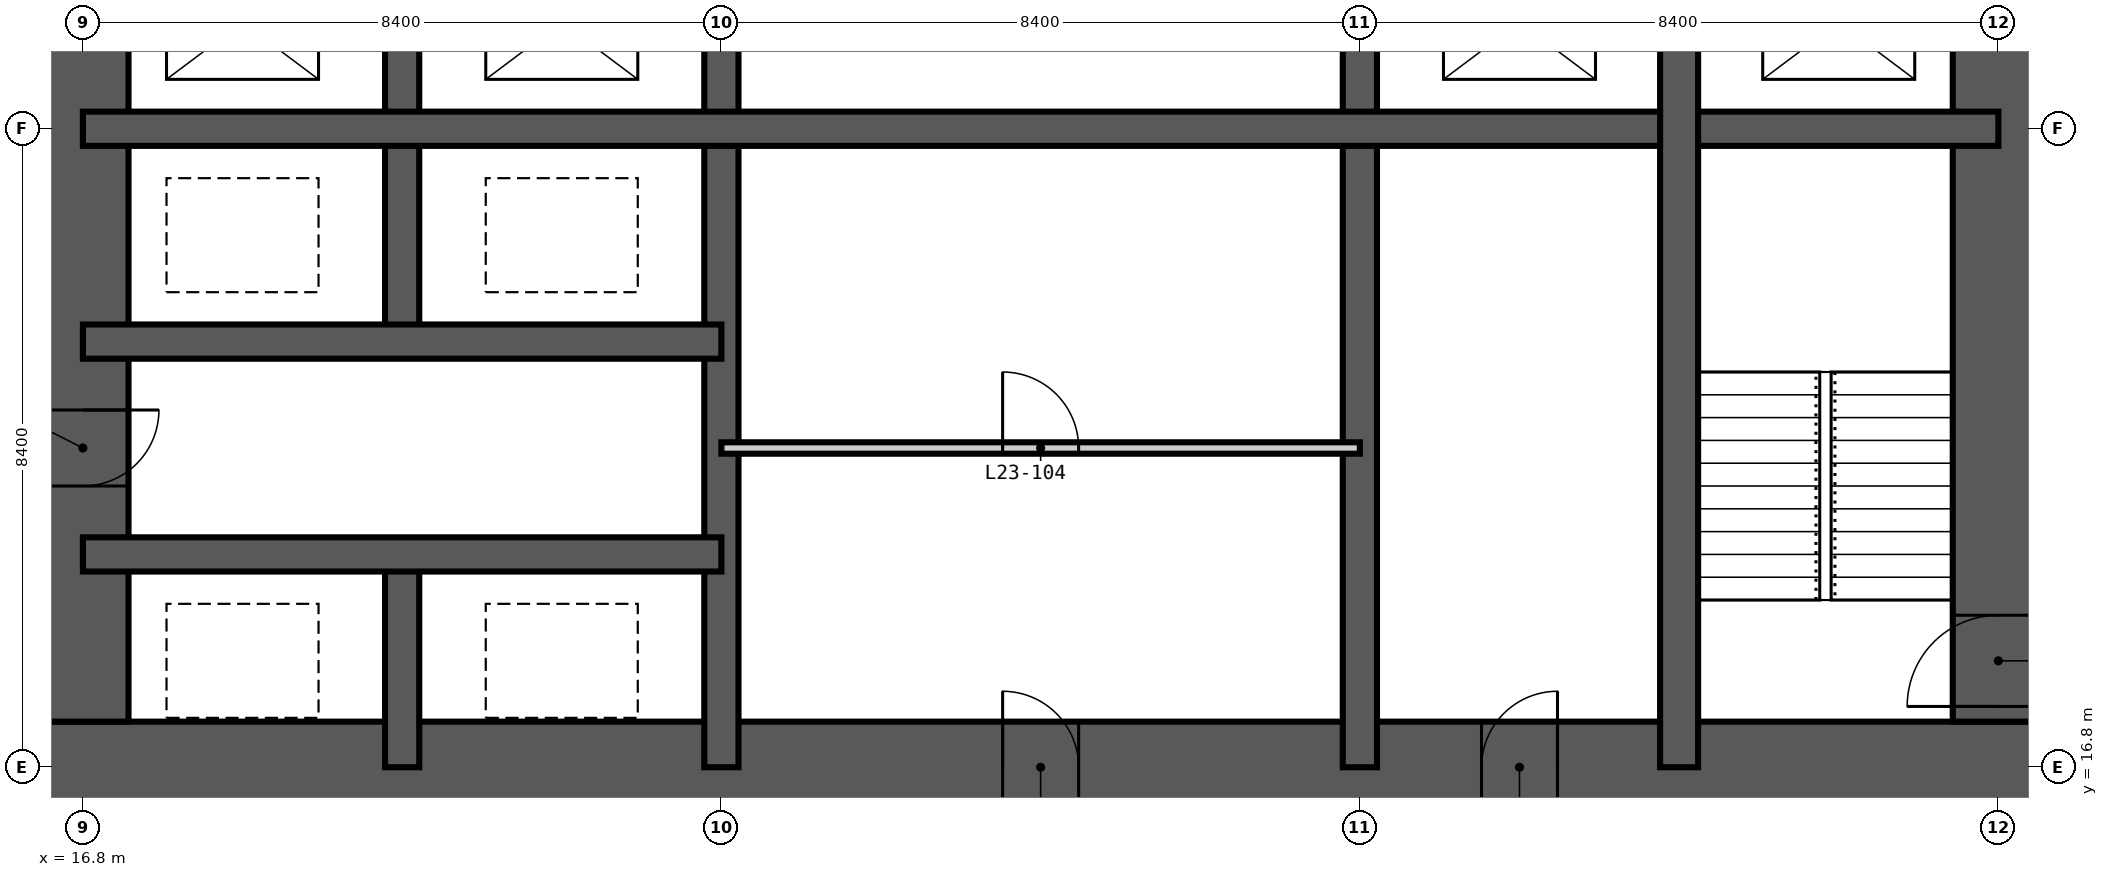
"""IFC4 building model, lengths in metres.
Left out: names, types, materials, properties, quantities, classifications, styles, units other than length and angle.
Written with IfcOpenShell. Run it as: python <this file> out.ifc"""

import sys

from ifc_helpers import new_model, si_unit, direction, frame, frame_2d, origin, place, context, subcontext, project, spatial, rectangle, extrude, element, fill, save


model = new_model("IFC4")
c1 = context("Model", 3, precision=1e-05, world=origin(), true_north=direction((0.0, 1.0)))
c2 = subcontext(c1, "Body", "Model", "MODEL_VIEW")
j1 = project(units=[si_unit("LENGTHUNIT", "METRE"), si_unit("PLANEANGLEUNIT", "RADIAN")], contexts=[c1])
p1 = place(None, origin())
s1 = spatial("IfcSite", under=j1, at=p1, CompositionType="ELEMENT")
p2 = place(p1, origin())
s2 = spatial("IfcBuilding", under=s1, at=p2, CompositionType="ELEMENT")
p3 = place(p2, frame((0.0, 0.0, 93.6)))
s3 = spatial("IfcBuildingStorey", under=s2, at=p3, CompositionType="ELEMENT", Elevation=93.6)
p4 = place(p3, frame((16.2, 16.8, -0.35), z_axis=(0.0, 0.0, 1.0), x_axis=(1.0, 0.0, 0.0)))
e1 = element("IfcWall", 1, at=p4, inside=s3, PredefinedType="SHEAR", context=c2, shape_type="SweptSolid", body=[
    extrude(rectangle(XDim=26.4, YDim=1.2, at=frame_2d((13.2, 0.0))), origin(), (0.0, 0.0, 1.0), 3.6),
])
p5 = place(p4, frame((12.7, 0.0, 0.35)))
e2 = element("IfcOpeningElement", 2, at=p5, cuts=e1, PredefinedType="OPENING", context=c2, shape_type="SweptSolid", body=[
    extrude(rectangle(XDim=1.0, YDim=2.1, at=frame_2d((0.5, 1.05))), frame((0.0, 0.61, 0.0), z_axis=(0.0, -1.0, 0.0), x_axis=(1.0, 0.0, 0.0)), (0.0, 0.0, 1.0), 1.22),
])
p6 = place(p4, frame((19.0, 0.0, 0.35)))
e3 = element("IfcOpeningElement", 3, at=p6, cuts=e1, PredefinedType="OPENING", context=c2, shape_type="SweptSolid", body=[
    extrude(rectangle(XDim=1.0, YDim=2.1, at=frame_2d((0.5, 1.05))), frame((0.0, 0.61, 0.0), z_axis=(0.0, -1.0, 0.0), x_axis=(1.0, 0.0, 0.0)), (0.0, 0.0, 1.0), 1.22),
])
p7 = place(p3, frame((42.0, 17.4, -0.35), z_axis=(0.0, 0.0, 1.0), x_axis=(0.0, 1.0, 0.0)))
e4 = element("IfcWall", 4, at=p7, inside=s3, PredefinedType="SHEAR", context=c2, shape_type="SweptSolid", body=[
    extrude(rectangle(XDim=24.0, YDim=1.2, at=frame_2d((12.0, 0.0))), origin(), (0.0, 0.0, 1.0), 3.6),
])
p8 = place(p7, frame((0.2, 0.0, 0.35)))
e5 = element("IfcOpeningElement", 5, at=p8, cuts=e4, PredefinedType="OPENING", context=c2, shape_type="SweptSolid", body=[
    extrude(rectangle(XDim=1.2, YDim=2.2, at=frame_2d((0.6, 1.1))), frame((0.0, 0.61, 0.0), z_axis=(0.0, -1.0, 0.0), x_axis=(1.0, 0.0, 0.0)), (0.0, 0.0, 1.0), 1.22),
])
p9 = place(p7, frame((11.1, 0.0, 0.35)))
e6 = element("IfcOpeningElement", 6, at=p9, cuts=e4, PredefinedType="OPENING", context=c2, shape_type="SweptSolid", body=[
    extrude(rectangle(XDim=1.8, YDim=2.2, at=frame_2d((0.9, 1.1))), frame((0.0, 0.61, 0.0), z_axis=(0.0, -1.0, 0.0), x_axis=(1.0, 0.0, 0.0)), (0.0, 0.0, 1.0), 1.22),
])
p10 = place(p7, frame((19.9, 0.0, 0.35)))
e7 = element("IfcOpeningElement", 7, at=p10, cuts=e4, PredefinedType="OPENING", context=c2, shape_type="SweptSolid", body=[
    extrude(rectangle(XDim=1.0, YDim=2.1, at=frame_2d((0.5, 1.05))), frame((0.0, 0.61, 0.0), z_axis=(0.0, -1.0, 0.0), x_axis=(1.0, 0.0, 0.0)), (0.0, 0.0, 1.0), 1.22),
])
p11 = place(p3, frame((16.8, 41.4, -0.35), z_axis=(0.0, 0.0, 1.0), x_axis=(0.0, -1.0, 0.0)))
e8 = element("IfcWall", 8, at=p11, inside=s3, PredefinedType="SHEAR", context=c2, shape_type="SweptSolid", body=[
    extrude(rectangle(XDim=24.0, YDim=1.2, at=frame_2d((12.0, 0.0))), origin(), (0.0, 0.0, 1.0), 3.6),
])
p12 = place(p11, frame((11.1, 0.0, 0.35)))
e9 = element("IfcOpeningElement", 9, at=p12, cuts=e8, PredefinedType="OPENING", context=c2, shape_type="SweptSolid", body=[
    extrude(rectangle(XDim=1.8, YDim=2.2, at=frame_2d((0.9, 1.1))), frame((0.0, 0.61, 0.0), z_axis=(0.0, -1.0, 0.0), x_axis=(1.0, 0.0, 0.0)), (0.0, 0.0, 1.0), 1.22),
])
p13 = place(p11, frame((19.9, 0.0, 0.35)))
e10 = element("IfcOpeningElement", 10, at=p13, cuts=e8, PredefinedType="OPENING", context=c2, shape_type="SweptSolid", body=[
    extrude(rectangle(XDim=1.0, YDim=2.1, at=frame_2d((0.5, 1.05))), frame((0.0, 0.61, 0.0), z_axis=(0.0, -1.0, 0.0), x_axis=(1.0, 0.0, 0.0)), (0.0, 0.0, 1.0), 1.22),
])
p14 = place(p11, frame((5.2, 0.0, 0.35)))
e11 = element("IfcOpeningElement", 11, at=p14, cuts=e8, PredefinedType="OPENING", context=c2, shape_type="SweptSolid", body=[
    extrude(rectangle(XDim=1.0, YDim=2.1, at=frame_2d((0.5, 1.05))), frame((0.0, 0.61, 0.0), z_axis=(0.0, -1.0, 0.0), x_axis=(1.0, 0.0, 0.0)), (0.0, 0.0, 1.0), 1.22),
])
p15 = place(p3, frame((21.0, 16.8, -0.35), z_axis=(0.0, 0.0, 1.0), x_axis=(0.0, 1.0, 0.0)))
e12 = element("IfcWall", 12, at=p15, inside=s3, PredefinedType="SHEAR", context=c2, shape_type="SweptSolid", body=[
    extrude(rectangle(XDim=2.8, YDim=0.45, at=frame_2d((1.4, 0.0))), origin(), (0.0, 0.0, 1.0), 3.6),
])
p16 = place(p3, frame((21.0, 22.4, -0.35), z_axis=(0.0, 0.0, 1.0), x_axis=(0.0, 1.0, 0.0)))
e13 = element("IfcWall", 13, at=p16, inside=s3, PredefinedType="SHEAR", context=c2, shape_type="SweptSolid", body=[
    extrude(rectangle(XDim=5.6, YDim=0.45, at=frame_2d((2.8, 0.0))), origin(), (0.0, 0.0, 1.0), 3.6),
])
p17 = place(p3, frame((25.2, 16.8, -0.35), z_axis=(0.0, 0.0, 1.0), x_axis=(0.0, 1.0, 0.0)))
e14 = element("IfcWall", 14, at=p17, inside=s3, PredefinedType="SHEAR", context=c2, shape_type="SweptSolid", body=[
    extrude(rectangle(XDim=25.2, YDim=0.45, at=frame_2d((12.6, 0.0))), origin(), (0.0, 0.0, 1.0), 3.6),
])
p18 = place(p17, frame((12.1, 0.0, 0.35)))
e15 = element("IfcOpeningElement", 15, at=p18, cuts=e14, PredefinedType="OPENING", context=c2, shape_type="SweptSolid", body=[
    extrude(rectangle(XDim=1.0, YDim=2.1, at=frame_2d((0.5, 1.05))), frame((0.0, 0.235, 0.0), z_axis=(0.0, -1.0, 0.0), x_axis=(1.0, 0.0, 0.0)), (0.0, 0.0, 1.0), 0.47),
])
p19 = place(p3, frame((33.6, 16.8, -0.35), z_axis=(0.0, 0.0, 1.0), x_axis=(0.0, 1.0, 0.0)))
e16 = element("IfcWall", 16, at=p19, inside=s3, PredefinedType="SHEAR", context=c2, shape_type="SweptSolid", body=[
    extrude(rectangle(XDim=25.2, YDim=0.45, at=frame_2d((12.6, 0.0))), origin(), (0.0, 0.0, 1.0), 3.6),
])
p20 = place(p19, frame((22.5, 0.0, 0.35)))
e17 = element("IfcOpeningElement", 17, at=p20, cuts=e16, PredefinedType="OPENING", context=c2, shape_type="SweptSolid", body=[
    extrude(rectangle(XDim=1.2, YDim=2.2, at=frame_2d((0.6, 1.1))), frame((0.0, 0.235, 0.0), z_axis=(0.0, -1.0, 0.0), x_axis=(1.0, 0.0, 0.0)), (0.0, 0.0, 1.0), 0.47),
])
p21 = place(p19, frame((18.3, 0.0, 0.35)))
e18 = element("IfcOpeningElement", 18, at=p21, cuts=e16, PredefinedType="OPENING", context=c2, shape_type="SweptSolid", body=[
    extrude(rectangle(XDim=1.2, YDim=2.2, at=frame_2d((0.6, 1.1))), frame((0.0, 0.235, 0.0), z_axis=(0.0, -1.0, 0.0), x_axis=(1.0, 0.0, 0.0)), (0.0, 0.0, 1.0), 0.47),
])
for number, where, z_axis, x_axis in (
    (19, (16.8, 19.6, -0.35), (0.0, 0.0, 1.0), (1.0, 0.0, 0.0)),
    (20, (16.8, 22.4, -0.35), (0.0, 0.0, 1.0), (1.0, 0.0, 0.0)),
):
    element("IfcWall", number, at=place(p3, frame(where, z_axis=z_axis, x_axis=x_axis)), inside=s3, PredefinedType="SHEAR", context=c2, shape_type="SweptSolid", body=[
        extrude(rectangle(XDim=8.4, YDim=0.45, at=frame_2d((4.2, 0.0))), origin(), (0.0, 0.0, 1.0), 3.6),
    ])
p22 = place(p3, frame((16.8, 25.2, -0.35), z_axis=(0.0, 0.0, 1.0), x_axis=(1.0, 0.0, 0.0)))
e21 = element("IfcWall", 21, at=p22, inside=s3, PredefinedType="SHEAR", context=c2, shape_type="SweptSolid", body=[
    extrude(rectangle(XDim=25.2, YDim=0.45, at=frame_2d((12.6, 0.0))), origin(), (0.0, 0.0, 1.0), 3.6),
])
p23 = place(p3, frame((37.8, 16.8, -0.35), z_axis=(0.0, 0.0, 1.0), x_axis=(0.0, 1.0, 0.0)))
e22 = element("IfcWall", 22, at=p23, inside=s3, PredefinedType="SHEAR", context=c2, shape_type="SweptSolid", body=[
    extrude(rectangle(XDim=11.2, YDim=0.5, at=frame_2d((5.6, 0.0))), origin(), (0.0, 0.0, 1.0), 3.6),
])
p24 = place(p3, frame((25.2, 21.0, 0.0), z_axis=(0.0, 0.0, 1.0), x_axis=(1.0, 0.0, 0.0)))
e23 = element("IfcWall", 23, at=p24, inside=s3, PredefinedType="PARTITIONING", context=c2, shape_type="SweptSolid", body=[
    extrude(rectangle(XDim=8.4, YDim=0.15, at=frame_2d((4.2, 0.0))), origin(), (0.0, 0.0, 1.0), 3.25),
])
p25 = place(p24, frame((3.7, 0.0, 0.0)))
e24 = element("IfcOpeningElement", 24, at=p25, cuts=e23, PredefinedType="OPENING", context=c2, shape_type="SweptSolid", body=[
    extrude(rectangle(XDim=1.0, YDim=2.1, at=frame_2d((0.5, 1.05))), frame((0.0, 0.085, 0.0), z_axis=(0.0, -1.0, 0.0), x_axis=(1.0, 0.0, 0.0)), (0.0, 0.0, 1.0), 0.17),
])
p26 = place(p8, origin())
e25 = element("IfcDoor", 25, at=p26, inside=s3, OperationType="SINGLE_SWING_LEFT", PredefinedType="DOOR", context=c2, shape_type="SweptSolid", body=[
    extrude(rectangle(XDim=1.2, YDim=2.2, at=frame_2d((0.6, 1.1))), frame((0.0, 0.025, 0.0), z_axis=(0.0, -1.0, 0.0), x_axis=(1.0, 0.0, 0.0)), (0.0, 0.0, 1.0), 0.05),
])
fill(e5, e25)
p27 = place(p13, origin())
e26 = element("IfcDoor", 26, at=p27, inside=s3, OperationType="SINGLE_SWING_LEFT", PredefinedType="DOOR", context=c2, shape_type="SweptSolid", body=[
    extrude(rectangle(XDim=1.0, YDim=2.1, at=frame_2d((0.5, 1.05))), frame((0.0, 0.025, 0.0), z_axis=(0.0, -1.0, 0.0), x_axis=(1.0, 0.0, 0.0)), (0.0, 0.0, 1.0), 0.05),
])
fill(e10, e26)
p28 = place(p5, origin())
e27 = element("IfcDoor", 27, at=p28, inside=s3, OperationType="SINGLE_SWING_LEFT", PredefinedType="DOOR", context=c2, shape_type="SweptSolid", body=[
    extrude(rectangle(XDim=1.0, YDim=2.1, at=frame_2d((0.5, 1.05))), frame((0.0, 0.025, 0.0), z_axis=(0.0, -1.0, 0.0), x_axis=(1.0, 0.0, 0.0)), (0.0, 0.0, 1.0), 0.05),
])
fill(e2, e27)
p29 = place(p25, origin())
e28 = element("IfcDoor", 28, at=p29, inside=s3, OperationType="SINGLE_SWING_LEFT", PredefinedType="DOOR", context=c2, shape_type="SweptSolid", body=[
    extrude(rectangle(XDim=1.0, YDim=2.1, at=frame_2d((0.5, 1.05))), frame((0.0, 0.025, 0.0), z_axis=(0.0, -1.0, 0.0), x_axis=(1.0, 0.0, 0.0)), (0.0, 0.0, 1.0), 0.05),
])
fill(e24, e28)
p30 = place(p6, origin())
e29 = element("IfcDoor", 29, at=p30, inside=s3, OperationType="SINGLE_SWING_RIGHT", PredefinedType="DOOR", context=c2, shape_type="SweptSolid", body=[
    extrude(rectangle(XDim=1.0, YDim=2.1, at=frame_2d((0.5, 1.05))), frame((0.0, 0.025, 0.0), z_axis=(0.0, -1.0, 0.0), x_axis=(1.0, 0.0, 0.0)), (0.0, 0.0, 1.0), 0.05),
])
fill(e3, e29)
save(model, sys.argv[1])
